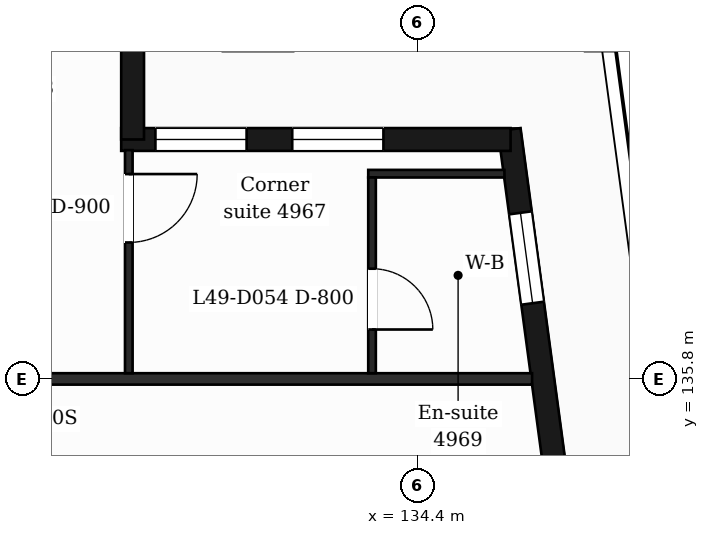
"""IFC4 building model, lengths in metres.
Left out: names, types, materials, properties, quantities, classifications, styles, units other than length and angle.
Written with IfcOpenShell. Run it as: python <this file> out.ifc"""

import sys

from ifc_helpers import new_model, si_unit, direction, frame, frame_2d, origin, place, context, subcontext, project, spatial, rectangle, extrude, element, fill, save


model = new_model("IFC4")
c1 = context("Model", 3, precision=1e-05, world=origin(), true_north=direction((0.0, 1.0)))
c2 = subcontext(c1, "Body", "Model", "MODEL_VIEW")
j1 = project(units=[si_unit("LENGTHUNIT", "METRE"), si_unit("PLANEANGLEUNIT", "RADIAN")], contexts=[c1])
p1 = place(None, origin())
s1 = spatial("IfcSite", under=j1, at=p1, CompositionType="ELEMENT")
p2 = place(p1, origin())
s2 = spatial("IfcBuilding", under=s1, at=p2, CompositionType="ELEMENT")
p3 = place(p2, frame((0.0, 0.0, 205.9)))
s3 = spatial("IfcBuildingStorey", under=s2, at=p3, CompositionType="ELEMENT", Elevation=205.9)
p4 = place(p3, frame((136.504, 132.4, 0.0), z_axis=(0.0, 0.0, 1.0), x_axis=(-0.133399697462, 0.99106231929, 0.0)))
e1 = element("IfcWall", 1, at=p4, inside=s3, PredefinedType="SOLIDWALL", context=c2, shape_type="SweptSolid", body=[
    extrude(rectangle(XDim=6.74, YDim=0.3, at=frame_2d((3.37, 0.0))), origin(), (0.0, 0.0, 1.0), 3.38),
])
p5 = place(p4, frame((1.115, 0.0, 0.0)))
e2 = element("IfcOpeningElement", 2, at=p5, cuts=e1, PredefinedType="OPENING", context=c2, shape_type="SweptSolid", body=[
    extrude(rectangle(XDim=1.2, YDim=2.4, at=frame_2d((0.6, 1.2))), frame((0.0, 0.16, 0.0), z_axis=(0.0, -1.0, 0.0), x_axis=(1.0, 0.0, 0.0)), (0.0, 0.0, 1.0), 0.32),
])
p6 = place(p4, frame((4.436, 0.0, 0.9)))
e3 = element("IfcOpeningElement", 3, at=p6, cuts=e1, PredefinedType="OPENING", context=c2, shape_type="SweptSolid", body=[
    extrude(rectangle(XDim=1.2, YDim=2.1, at=frame_2d((0.6, 1.05))), frame((0.0, 0.16, 0.0), z_axis=(0.0, -1.0, 0.0), x_axis=(1.0, 0.0, 0.0)), (0.0, 0.0, 1.0), 0.32),
])
p7 = place(p3, frame((135.623, 138.95, 0.0), z_axis=(0.0, 0.0, 1.0), x_axis=(-1.0, 0.0, 0.0)))
e4 = element("IfcWall", 4, at=p7, inside=s3, PredefinedType="SOLIDWALL", context=c2, shape_type="SweptSolid", body=[
    extrude(rectangle(XDim=5.123, YDim=0.3, at=frame_2d((2.561, 0.0))), origin(), (0.0, 0.0, 1.0), 3.38),
])
p8 = place(p7, frame((1.673, 0.0, 0.9)))
e5 = element("IfcOpeningElement", 5, at=p8, cuts=e4, PredefinedType="OPENING", context=c2, shape_type="SweptSolid", body=[
    extrude(rectangle(XDim=1.2, YDim=2.1, at=frame_2d((0.6, 1.05))), frame((0.0, 0.16, 0.0), z_axis=(0.0, -1.0, 0.0), x_axis=(1.0, 0.0, 0.0)), (0.0, 0.0, 1.0), 0.32),
])
p9 = place(p7, frame((3.473, 0.0, 0.9)))
e6 = element("IfcOpeningElement", 6, at=p9, cuts=e4, PredefinedType="OPENING", context=c2, shape_type="SweptSolid", body=[
    extrude(rectangle(XDim=1.2, YDim=2.1, at=frame_2d((0.6, 1.05))), frame((0.0, 0.16, 0.0), z_axis=(0.0, -1.0, 0.0), x_axis=(1.0, 0.0, 0.0)), (0.0, 0.0, 1.0), 0.32),
])
p10 = place(p3, frame((130.65, 138.95, 0.0), z_axis=(0.0, 0.0, 1.0), x_axis=(0.0, 1.0, 0.0)))
e7 = element("IfcWall", 7, at=p10, inside=s3, PredefinedType="SOLIDWALL", context=c2, shape_type="SweptSolid", body=[
    extrude(rectangle(XDim=4.35, YDim=0.3, at=frame_2d((2.175, 0.0))), origin(), (0.0, 0.0, 1.0), 3.38),
])
p11 = place(p10, frame((2.1, 0.0, 0.0)))
e8 = element("IfcOpeningElement", 8, at=p11, cuts=e7, PredefinedType="OPENING", context=c2, shape_type="SweptSolid", body=[
    extrude(rectangle(XDim=1.2, YDim=2.4, at=frame_2d((0.6, 1.2))), frame((0.0, 0.16, 0.0), z_axis=(0.0, -1.0, 0.0), x_axis=(1.0, 0.0, 0.0)), (0.0, 0.0, 1.0), 0.32),
])
p12 = place(p3, frame((90.895, 135.8, 0.0), z_axis=(0.0, 0.0, 1.0), x_axis=(1.0, 0.0, 0.0)))
e9 = element("IfcWall", 9, at=p12, inside=s3, PredefinedType="PARTITIONING", context=c2, shape_type="SweptSolid", body=[
    extrude(rectangle(XDim=45.011, YDim=0.15, at=frame_2d((22.505, 0.0))), origin(), (0.0, 0.0, 1.0), 3.38),
])
p13 = place(p12, frame((7.675, 0.0, 0.0)))
e10 = element("IfcOpeningElement", 10, at=p13, cuts=e9, PredefinedType="OPENING", context=c2, shape_type="SweptSolid", body=[
    extrude(rectangle(XDim=1.0, YDim=2.1, at=frame_2d((0.5, 1.05))), frame((0.0, 0.085, 0.0), z_axis=(0.0, -1.0, 0.0), x_axis=(1.0, 0.0, 0.0)), (0.0, 0.0, 1.0), 0.17),
])
p14 = place(p12, frame((10.575, 0.0, 0.0)))
e11 = element("IfcOpeningElement", 11, at=p14, cuts=e9, PredefinedType="OPENING", context=c2, shape_type="SweptSolid", body=[
    extrude(rectangle(XDim=0.95, YDim=2.1, at=frame_2d((0.475, 1.05))), frame((0.0, 0.085, 0.0), z_axis=(0.0, -1.0, 0.0), x_axis=(1.0, 0.0, 0.0)), (0.0, 0.0, 1.0), 0.17),
])
p15 = place(p12, frame((18.979, 0.0, 0.0)))
e12 = element("IfcOpeningElement", 12, at=p15, cuts=e9, PredefinedType="OPENING", context=c2, shape_type="SweptSolid", body=[
    extrude(rectangle(XDim=0.95, YDim=2.1, at=frame_2d((0.475, 1.05))), frame((0.0, 0.085, 0.0), z_axis=(0.0, -1.0, 0.0), x_axis=(1.0, 0.0, 0.0)), (0.0, 0.0, 1.0), 0.17),
])
p16 = place(p12, frame((23.035, 0.0, 0.0)))
e13 = element("IfcOpeningElement", 13, at=p16, cuts=e9, PredefinedType="OPENING", context=c2, shape_type="SweptSolid", body=[
    extrude(rectangle(XDim=0.95, YDim=2.1, at=frame_2d((0.475, 1.05))), frame((0.0, 0.085, 0.0), z_axis=(0.0, -1.0, 0.0), x_axis=(1.0, 0.0, 0.0)), (0.0, 0.0, 1.0), 0.17),
])
p17 = place(p12, frame((29.23, 0.0, 0.0)))
e14 = element("IfcOpeningElement", 14, at=p17, cuts=e9, PredefinedType="OPENING", context=c2, shape_type="SweptSolid", body=[
    extrude(rectangle(XDim=0.95, YDim=2.1, at=frame_2d((0.475, 1.05))), frame((0.0, 0.085, 0.0), z_axis=(0.0, -1.0, 0.0), x_axis=(1.0, 0.0, 0.0)), (0.0, 0.0, 1.0), 0.17),
])
p18 = place(p12, frame((31.367, 0.0, 0.0)))
e15 = element("IfcOpeningElement", 15, at=p18, cuts=e9, PredefinedType="OPENING", context=c2, shape_type="SweptSolid", body=[
    extrude(rectangle(XDim=0.95, YDim=2.1, at=frame_2d((0.475, 1.05))), frame((0.0, 0.085, 0.0), z_axis=(0.0, -1.0, 0.0), x_axis=(1.0, 0.0, 0.0)), (0.0, 0.0, 1.0), 0.17),
])
p19 = place(p12, frame((36.906, 0.0, 0.0)))
e16 = element("IfcOpeningElement", 16, at=p19, cuts=e9, PredefinedType="OPENING", context=c2, shape_type="SweptSolid", body=[
    extrude(rectangle(XDim=1.0, YDim=2.1, at=frame_2d((0.5, 1.05))), frame((0.0, 0.085, 0.0), z_axis=(0.0, -1.0, 0.0), x_axis=(1.0, 0.0, 0.0)), (0.0, 0.0, 1.0), 0.17),
])
p20 = place(p3, frame((133.75, 138.5, 0.0), z_axis=(0.0, 0.0, 1.0), x_axis=(1.0, 0.0, 0.0)))
e17 = element("IfcWall", 17, at=p20, inside=s3, PredefinedType="PARTITIONING", context=c2, shape_type="SweptSolid", body=[
    extrude(rectangle(XDim=1.792, YDim=0.1, at=frame_2d((0.896, 0.0))), origin(), (0.0, 0.0, 1.0), 3.38),
])
p21 = place(p3, frame((130.6, 135.875, 0.0), z_axis=(0.0, 0.0, 1.0), x_axis=(0.0, 1.0, 0.0)))
e18 = element("IfcWall", 18, at=p21, inside=s3, PredefinedType="PARTITIONING", context=c2, shape_type="SweptSolid", body=[
    extrude(rectangle(XDim=2.935, YDim=0.1, at=frame_2d((1.468, 0.0))), origin(), (0.0, 0.0, 1.0), 3.38),
])
p22 = place(p21, frame((1.72, 0.0, 0.0)))
e19 = element("IfcOpeningElement", 19, at=p22, cuts=e18, PredefinedType="OPENING", context=c2, shape_type="SweptSolid", body=[
    extrude(rectangle(XDim=0.9, YDim=2.1, at=frame_2d((0.45, 1.05))), frame((0.0, 0.06, 0.0), z_axis=(0.0, -1.0, 0.0), x_axis=(1.0, 0.0, 0.0)), (0.0, 0.0, 1.0), 0.12),
])
p23 = place(p3, frame((133.8, 135.875, 0.0), z_axis=(0.0, 0.0, 1.0), x_axis=(0.0, 1.0, 0.0)))
e20 = element("IfcWall", 20, at=p23, inside=s3, PredefinedType="PARTITIONING", context=c2, shape_type="SweptSolid", body=[
    extrude(rectangle(XDim=2.575, YDim=0.1, at=frame_2d((1.288, 0.0))), origin(), (0.0, 0.0, 1.0), 3.38),
])
p24 = place(p23, frame((0.575, 0.0, 0.0)))
e21 = element("IfcOpeningElement", 21, at=p24, cuts=e20, PredefinedType="OPENING", context=c2, shape_type="SweptSolid", body=[
    extrude(rectangle(XDim=0.8, YDim=2.1, at=frame_2d((0.4, 1.05))), frame((0.0, 0.06, 0.0), z_axis=(0.0, -1.0, 0.0), x_axis=(1.0, 0.0, 0.0)), (0.0, 0.0, 1.0), 0.12),
])
p25 = place(p6, origin())
e22 = element("IfcWindow", 22, at=p25, inside=s3, PartitioningType="SINGLE_PANEL", PredefinedType="WINDOW", context=c2, shape_type="SweptSolid", body=[
    extrude(rectangle(XDim=1.2, YDim=2.1, at=frame_2d((0.6, 1.05))), frame((0.0, 0.03, 0.0), z_axis=(0.0, -1.0, 0.0), x_axis=(1.0, 0.0, 0.0)), (0.0, 0.0, 1.0), 0.06),
])
fill(e3, e22)
p26 = place(p8, origin())
e23 = element("IfcWindow", 23, at=p26, inside=s3, PartitioningType="SINGLE_PANEL", PredefinedType="WINDOW", context=c2, shape_type="SweptSolid", body=[
    extrude(rectangle(XDim=1.2, YDim=2.1, at=frame_2d((0.6, 1.05))), frame((0.0, 0.03, 0.0), z_axis=(0.0, -1.0, 0.0), x_axis=(1.0, 0.0, 0.0)), (0.0, 0.0, 1.0), 0.06),
])
fill(e5, e23)
p27 = place(p9, origin())
e24 = element("IfcWindow", 24, at=p27, inside=s3, PartitioningType="SINGLE_PANEL", PredefinedType="WINDOW", context=c2, shape_type="SweptSolid", body=[
    extrude(rectangle(XDim=1.2, YDim=2.1, at=frame_2d((0.6, 1.05))), frame((0.0, 0.03, 0.0), z_axis=(0.0, -1.0, 0.0), x_axis=(1.0, 0.0, 0.0)), (0.0, 0.0, 1.0), 0.06),
])
fill(e6, e24)
p28 = place(p22, origin())
e25 = element("IfcDoor", 25, at=p28, inside=s3, OperationType="SINGLE_SWING_RIGHT", PredefinedType="DOOR", context=c2, shape_type="SweptSolid", body=[
    extrude(rectangle(XDim=0.9, YDim=2.1, at=frame_2d((0.45, 1.05))), frame((0.0, 0.025, 0.0), z_axis=(0.0, -1.0, 0.0), x_axis=(1.0, 0.0, 0.0)), (0.0, 0.0, 1.0), 0.05),
])
fill(e19, e25)
p29 = place(p24, origin())
e26 = element("IfcDoor", 26, at=p29, inside=s3, OperationType="SINGLE_SWING_LEFT", PredefinedType="DOOR", context=c2, shape_type="SweptSolid", body=[
    extrude(rectangle(XDim=0.8, YDim=2.1, at=frame_2d((0.4, 1.05))), frame((0.0, 0.025, 0.0), z_axis=(0.0, -1.0, 0.0), x_axis=(1.0, 0.0, 0.0)), (0.0, 0.0, 1.0), 0.05),
])
fill(e21, e26)
save(model, sys.argv[1])
